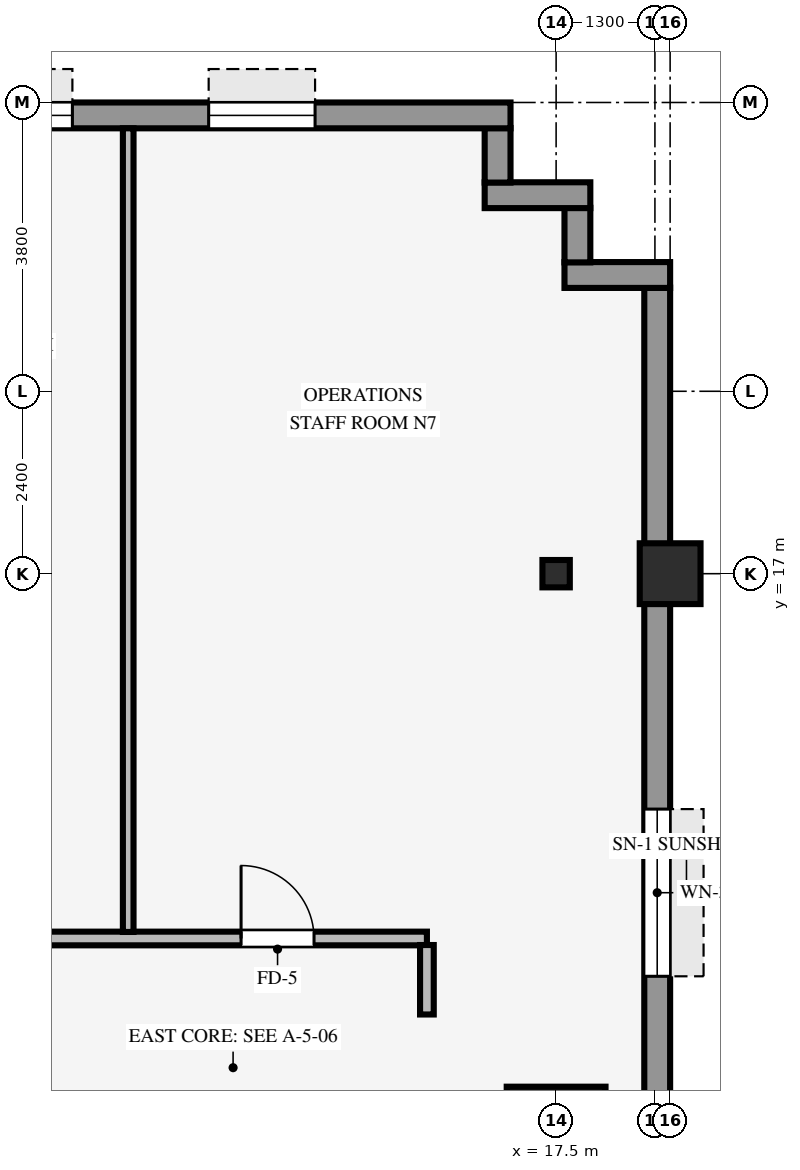
"""IFC4 building model, lengths in metres.
Left out: names, types, materials, properties, quantities, classifications, styles, units other than length and angle.
Written with IfcOpenShell. Run it as: python <this file> out.ifc"""

import sys

from ifc_helpers import new_model, si_unit, direction, frame, frame_2d, origin, origin_2d, place, context, subcontext, project, spatial, rectangle, hollow_rectangle, i_section, extrude, source, transform, mapped, element, fill, save


model = new_model("IFC4")
c1 = context("Model", 3, precision=1e-05, world=origin(), true_north=direction((0.0, 1.0)))
c2 = subcontext(c1, "Body", "Model", "MODEL_VIEW")
j1 = project(units=[si_unit("LENGTHUNIT", "METRE"), si_unit("PLANEANGLEUNIT", "RADIAN")], contexts=[c1])
p1 = place(None, origin())
s1 = spatial("IfcSite", under=j1, at=p1, CompositionType="ELEMENT")
p2 = place(p1, origin())
s2 = spatial("IfcBuilding", under=s1, at=p2, CompositionType="ELEMENT")
p3 = place(p2, frame((0.0, 0.0, 49.5)))
s3 = spatial("IfcBuildingStorey", under=s2, at=p3, CompositionType="ELEMENT", Elevation=49.5)
p4 = place(p3, frame((17.5, 9.6, 0.0), z_axis=(0.0, 0.0, 1.0), x_axis=(1.0, 0.0, 0.0)))
e1 = element("IfcColumn", 1, at=p4, inside=s3, PredefinedType="COLUMN", context=c2, shape_type="SweptSolid", body=[
    extrude(rectangle(XDim=1.3, YDim=1.3, at=origin_2d()), origin(), (0.0, 0.0, 1.0), 3.37),
])
p5 = place(p3, frame((19.0, 17.0, 0.0), z_axis=(0.0, 0.0, 1.0), x_axis=(1.0, 0.0, 0.0)))
e2 = element("IfcColumn", 2, at=p5, inside=s3, PredefinedType="COLUMN", context=c2, shape_type="SweptSolid", body=[
    extrude(hollow_rectangle(XDim=0.8, YDim=0.8, WallThickness=0.055, InnerFilletRadius=0.055, OuterFilletRadius=0.11, at=origin_2d()), origin(), (0.0, 0.0, 1.0), 3.37),
])
p6 = place(p3, frame((17.5, 17.0, 0.0), z_axis=(0.0, 0.0, 1.0), x_axis=(1.0, 0.0, 0.0)))
e3 = element("IfcColumn", 3, at=p6, inside=s3, PredefinedType="COLUMN", context=c2, shape_type="SweptSolid", body=[
    extrude(i_section(OverallWidth=0.36, OverallDepth=0.36, WebThickness=0.021, FlangeThickness=0.021, FilletRadius=0.018, at=origin_2d()), origin(), (0.0, 0.0, 1.0), 3.37),
])
p7 = place(p3, frame((18.83, -20.764, 0.0), z_axis=(0.0, 0.0, 1.0), x_axis=(0.0, 1.0, 0.0)))
e4 = element("IfcWall", 4, at=p7, inside=s3, PredefinedType="STANDARD", context=c2, shape_type="SweptSolid", body=[
    extrude(rectangle(XDim=41.528, YDim=0.34, at=frame_2d((20.764, 0.0))), origin(), (0.0, 0.0, 1.0), 2.705),
])
p8 = place(p7, frame((6.862, 0.0, 0.8)))
e5 = element("IfcOpeningElement", 5, at=p8, cuts=e4, PredefinedType="OPENING", context=c2, shape_type="SweptSolid", body=[
    extrude(rectangle(XDim=2.2, YDim=1.65, at=frame_2d((1.1, 0.825))), frame((0.0, 0.18, 0.0), z_axis=(0.0, -1.0, 0.0), x_axis=(1.0, 0.0, 0.0)), (0.0, 0.0, 1.0), 0.36),
])
p9 = place(p7, frame((32.467, 0.0, 0.8)))
e6 = element("IfcOpeningElement", 6, at=p9, cuts=e4, PredefinedType="OPENING", context=c2, shape_type="SweptSolid", body=[
    extrude(rectangle(XDim=2.2, YDim=1.65, at=frame_2d((1.1, 0.825))), frame((0.0, 0.18, 0.0), z_axis=(0.0, -1.0, 0.0), x_axis=(1.0, 0.0, 0.0)), (0.0, 0.0, 1.0), 0.36),
])
p10 = place(p3, frame((17.61, 20.93, 0.0), z_axis=(0.0, 0.0, 1.0), x_axis=(1.0, 0.0, 0.0)))
e7 = element("IfcWall", 7, at=p10, inside=s3, PredefinedType="STANDARD", context=c2, shape_type="SweptSolid", body=[
    extrude(rectangle(XDim=1.39, YDim=0.34, at=frame_2d((0.695, 0.0))), origin(), (0.0, 0.0, 1.0), 3.36),
])
p11 = place(p3, frame((17.78, 21.096, 0.0), z_axis=(0.0, 0.0, 1.0), x_axis=(0.0, 1.0, 0.0)))
e8 = element("IfcWall", 8, at=p11, inside=s3, PredefinedType="STANDARD", context=c2, shape_type="SweptSolid", body=[
    extrude(rectangle(XDim=0.718, YDim=0.34, at=frame_2d((0.359, 0.0))), origin(), (0.0, 0.0, 1.0), 3.36),
])
p12 = place(p3, frame((16.56, 21.98, 0.0), z_axis=(0.0, 0.0, 1.0), x_axis=(1.0, 0.0, 0.0)))
e9 = element("IfcWall", 9, at=p12, inside=s3, PredefinedType="STANDARD", context=c2, shape_type="SweptSolid", body=[
    extrude(rectangle(XDim=1.39, YDim=0.34, at=frame_2d((0.695, 0.0))), origin(), (0.0, 0.0, 1.0), 3.36),
])
p13 = place(p3, frame((16.73, 22.146, 0.0), z_axis=(0.0, 0.0, 1.0), x_axis=(0.0, 1.0, 0.0)))
e10 = element("IfcWall", 10, at=p13, inside=s3, PredefinedType="STANDARD", context=c2, shape_type="SweptSolid", body=[
    extrude(rectangle(XDim=0.718, YDim=0.34, at=frame_2d((0.359, 0.0))), origin(), (0.0, 0.0, 1.0), 3.36),
])
p14 = place(p3, frame((-16.9, 23.03, 0.0), z_axis=(0.0, 0.0, 1.0), x_axis=(1.0, 0.0, 0.0)))
e11 = element("IfcWall", 11, at=p14, inside=s3, PredefinedType="STANDARD", context=c2, shape_type="SweptSolid", body=[
    extrude(rectangle(XDim=33.8, YDim=0.34, at=frame_2d((16.9, 0.0))), origin(), (0.0, 0.0, 1.0), 2.705),
])
p15 = place(p14, frame((2.121, 0.0, 0.8)))
e12 = element("IfcOpeningElement", 12, at=p15, cuts=e11, PredefinedType="OPENING", context=c2, shape_type="SweptSolid", body=[
    extrude(rectangle(XDim=1.4, YDim=1.65, at=frame_2d((0.7, 0.825))), frame((0.0, 0.18, 0.0), z_axis=(0.0, -1.0, 0.0), x_axis=(1.0, 0.0, 0.0)), (0.0, 0.0, 1.0), 0.36),
])
p16 = place(p14, frame((5.764, 0.0, 0.8)))
e13 = element("IfcOpeningElement", 13, at=p16, cuts=e11, PredefinedType="OPENING", context=c2, shape_type="SweptSolid", body=[
    extrude(rectangle(XDim=1.4, YDim=1.65, at=frame_2d((0.7, 0.825))), frame((0.0, 0.18, 0.0), z_axis=(0.0, -1.0, 0.0), x_axis=(1.0, 0.0, 0.0)), (0.0, 0.0, 1.0), 0.36),
])
p17 = place(p14, frame((11.657, 0.0, 0.8)))
e14 = element("IfcOpeningElement", 14, at=p17, cuts=e11, PredefinedType="OPENING", context=c2, shape_type="SweptSolid", body=[
    extrude(rectangle(XDim=1.4, YDim=1.65, at=frame_2d((0.7, 0.825))), frame((0.0, 0.18, 0.0), z_axis=(0.0, -1.0, 0.0), x_axis=(1.0, 0.0, 0.0)), (0.0, 0.0, 1.0), 0.36),
])
p18 = place(p14, frame((21.193, 0.0, 0.8)))
e15 = element("IfcOpeningElement", 15, at=p18, cuts=e11, PredefinedType="OPENING", context=c2, shape_type="SweptSolid", body=[
    extrude(rectangle(XDim=1.4, YDim=1.65, at=frame_2d((0.7, 0.825))), frame((0.0, 0.18, 0.0), z_axis=(0.0, -1.0, 0.0), x_axis=(1.0, 0.0, 0.0)), (0.0, 0.0, 1.0), 0.36),
])
p19 = place(p14, frame((26.636, 0.0, 0.8)))
e16 = element("IfcOpeningElement", 16, at=p19, cuts=e11, PredefinedType="OPENING", context=c2, shape_type="SweptSolid", body=[
    extrude(rectangle(XDim=1.4, YDim=1.65, at=frame_2d((0.7, 0.825))), frame((0.0, 0.18, 0.0), z_axis=(0.0, -1.0, 0.0), x_axis=(1.0, 0.0, 0.0)), (0.0, 0.0, 1.0), 0.36),
])
p20 = place(p14, frame((29.829, 0.0, 0.8)))
e17 = element("IfcOpeningElement", 17, at=p20, cuts=e11, PredefinedType="OPENING", context=c2, shape_type="SweptSolid", body=[
    extrude(rectangle(XDim=1.4, YDim=1.65, at=frame_2d((0.7, 0.825))), frame((0.0, 0.18, 0.0), z_axis=(0.0, -1.0, 0.0), x_axis=(1.0, 0.0, 0.0)), (0.0, 0.0, 1.0), 0.36),
])
p21 = place(p3, frame((-15.8, 12.2, 0.0), z_axis=(0.0, 0.0, 1.0), x_axis=(1.0, 0.0, 0.0)))
e18 = element("IfcWall", 18, at=p21, inside=s3, PredefinedType="PARTITIONING", context=c2, shape_type="SweptSolid", body=[
    extrude(rectangle(XDim=31.6, YDim=0.18, at=frame_2d((15.8, 0.0))), origin(), (0.0, 0.0, 1.0), 3.36),
])
p22 = place(p21, frame((5.605, 0.0, 0.0)))
e19 = element("IfcOpeningElement", 19, at=p22, cuts=e18, PredefinedType="OPENING", context=c2, shape_type="SweptSolid", body=[
    extrude(rectangle(XDim=0.96, YDim=2.1, at=frame_2d((0.48, 1.05))), frame((0.0, 0.1, 0.0), z_axis=(0.0, -1.0, 0.0), x_axis=(1.0, 0.0, 0.0)), (0.0, 0.0, 1.0), 0.2),
])
p23 = place(p21, frame((16.895, 0.0, 0.0)))
e20 = element("IfcOpeningElement", 20, at=p23, cuts=e18, PredefinedType="OPENING", context=c2, shape_type="SweptSolid", body=[
    extrude(rectangle(XDim=0.96, YDim=2.1, at=frame_2d((0.48, 1.05))), frame((0.0, 0.1, 0.0), z_axis=(0.0, -1.0, 0.0), x_axis=(1.0, 0.0, 0.0)), (0.0, 0.0, 1.0), 0.2),
])
p24 = place(p21, frame((21.25, 0.0, 0.0)))
e21 = element("IfcOpeningElement", 21, at=p24, cuts=e18, PredefinedType="OPENING", context=c2, shape_type="SweptSolid", body=[
    extrude(rectangle(XDim=0.96, YDim=2.1, at=frame_2d((0.48, 1.05))), frame((0.0, 0.1, 0.0), z_axis=(0.0, -1.0, 0.0), x_axis=(1.0, 0.0, 0.0)), (0.0, 0.0, 1.0), 0.2),
])
p25 = place(p21, frame((25.21, 0.0, 0.0)))
e22 = element("IfcOpeningElement", 22, at=p25, cuts=e18, PredefinedType="OPENING", context=c2, shape_type="SweptSolid", body=[
    extrude(rectangle(XDim=0.96, YDim=2.1, at=frame_2d((0.48, 1.05))), frame((0.0, 0.1, 0.0), z_axis=(0.0, -1.0, 0.0), x_axis=(1.0, 0.0, 0.0)), (0.0, 0.0, 1.0), 0.2),
])
p26 = place(p21, frame((29.155, 0.0, 0.0)))
e23 = element("IfcOpeningElement", 23, at=p26, cuts=e18, PredefinedType="OPENING", context=c2, shape_type="SweptSolid", body=[
    extrude(rectangle(XDim=0.96, YDim=2.1, at=frame_2d((0.48, 1.05))), frame((0.0, 0.1, 0.0), z_axis=(0.0, -1.0, 0.0), x_axis=(1.0, 0.0, 0.0)), (0.0, 0.0, 1.0), 0.2),
])
p27 = place(p21, frame((10.5, 0.0, 0.0)))
e24 = element("IfcOpeningElement", 24, at=p27, cuts=e18, PredefinedType="OPENING", context=c2, shape_type="SweptSolid", body=[
    extrude(rectangle(XDim=0.96, YDim=2.1, at=frame_2d((0.48, 1.05))), frame((0.0, 0.1, 0.0), z_axis=(0.0, -1.0, 0.0), x_axis=(1.0, 0.0, 0.0)), (0.0, 0.0, 1.0), 0.2),
])
p28 = place(p21, frame((0.925, 0.0, 0.0)))
e25 = element("IfcOpeningElement", 25, at=p28, cuts=e18, PredefinedType="OPENING", context=c2, shape_type="SweptSolid", body=[
    extrude(rectangle(XDim=0.96, YDim=2.1, at=frame_2d((0.48, 1.05))), frame((0.0, 0.1, 0.0), z_axis=(0.0, -1.0, 0.0), x_axis=(1.0, 0.0, 0.0)), (0.0, 0.0, 1.0), 0.2),
])
p29 = place(p3, frame((11.87, 12.286, 0.0), z_axis=(0.0, 0.0, 1.0), x_axis=(0.0, 1.0, 0.0)))
e26 = element("IfcWall", 26, at=p29, inside=s3, PredefinedType="PARTITIONING", context=c2, shape_type="SweptSolid", body=[
    extrude(rectangle(XDim=10.574, YDim=0.14, at=frame_2d((5.287, 0.0))), origin(), (0.0, 0.0, 1.0), 3.36),
])
p30 = place(p3, frame((15.8, 11.2, 0.0), z_axis=(0.0, 0.0, 1.0), x_axis=(0.0, 1.0, 0.0)))
e27 = element("IfcWall", 27, at=p30, inside=s3, PredefinedType="PARTITIONING", context=c2, shape_type="SweptSolid", body=[
    extrude(rectangle(XDim=0.914, YDim=0.18, at=frame_2d((0.457, 0.0))), origin(), (0.0, 0.0, 1.0), 3.36),
])
m1 = source(origin(), c2, "Body", "SweptSolid", [
    extrude(rectangle(XDim=2.2, YDim=1.65, at=frame_2d((1.1, 0.825))), frame((0.0, 0.03, 0.0), z_axis=(0.0, -1.0, 0.0), x_axis=(1.0, 0.0, 0.0)), (0.0, 0.0, 1.0), 0.06),
])
p31 = place(p9, origin())
e28 = element("IfcWindow", 28, at=p31, inside=s3, PartitioningType="SINGLE_PANEL", PredefinedType="WINDOW", context=c2, shape_type="MappedRepresentation", body=[
    mapped(m1, transform((0.0, 0.0, 0.0), scale=1.0)),
])
fill(e6, e28)
m2 = source(origin(), c2, "Body", "SweptSolid", [
    extrude(rectangle(XDim=1.4, YDim=1.65, at=frame_2d((0.7, 0.825))), frame((0.0, 0.03, 0.0), z_axis=(0.0, -1.0, 0.0), x_axis=(1.0, 0.0, 0.0)), (0.0, 0.0, 1.0), 0.06),
])
p32 = place(p19, origin())
e29 = element("IfcWindow", 29, at=p32, inside=s3, PartitioningType="SINGLE_PANEL", PredefinedType="WINDOW", context=c2, shape_type="MappedRepresentation", body=[
    mapped(m2, transform((0.0, 0.0, 0.0), scale=1.0)),
])
fill(e16, e29)
p33 = place(p20, origin())
e30 = element("IfcWindow", 30, at=p33, inside=s3, PartitioningType="SINGLE_PANEL", PredefinedType="WINDOW", context=c2, shape_type="MappedRepresentation", body=[
    mapped(m2, transform((0.0, 0.0, 0.0), scale=1.0)),
])
fill(e17, e30)
m3 = source(origin(), c2, "Body", "SweptSolid", [
    extrude(rectangle(XDim=0.96, YDim=2.1, at=frame_2d((0.48, 1.05))), frame((0.0, 0.025, 0.0), z_axis=(0.0, -1.0, 0.0), x_axis=(1.0, 0.0, 0.0)), (0.0, 0.0, 1.0), 0.05),
])
p34 = place(p26, origin())
e31 = element("IfcDoor", 31, at=p34, inside=s3, OperationType="SINGLE_SWING_LEFT", PredefinedType="DOOR", context=c2, shape_type="MappedRepresentation", body=[
    mapped(m3, transform((0.0, 0.0, 0.0), scale=1.0)),
])
fill(e23, e31)
save(model, sys.argv[1])
